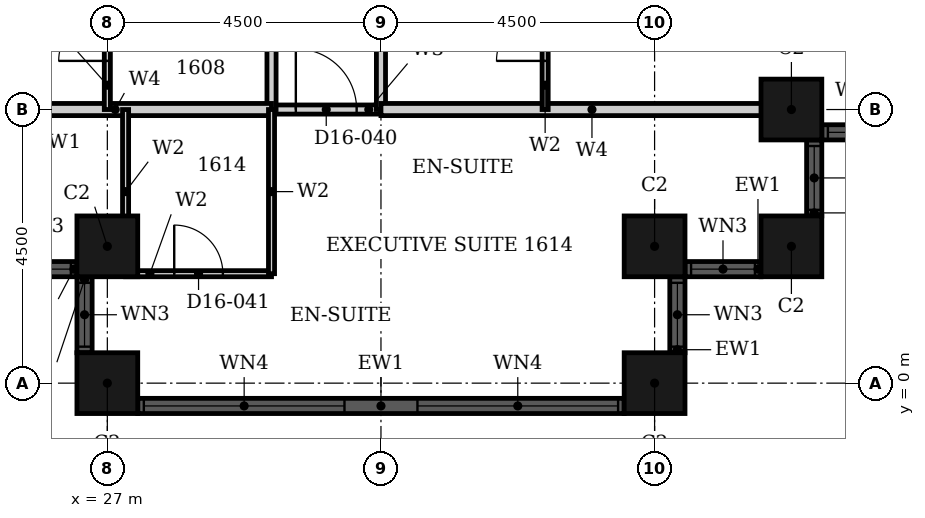
"""IFC4 building model, lengths in metres.
Left out: names, types, materials, properties, quantities, classifications, styles, units other than length and angle.
Written with IfcOpenShell. Run it as: python <this file> out.ifc"""

import sys

from ifc_helpers import new_model, si_unit, direction, frame, frame_2d, origin, origin_2d, place, context, subcontext, project, spatial, rectangle, hollow_rectangle, extrude, element, fill, save


model = new_model("IFC4")
c1 = context("Model", 3, precision=1e-05, world=origin(), true_north=direction((0.0, 1.0)))
c2 = subcontext(c1, "Body", "Model", "MODEL_VIEW")
j1 = project(units=[si_unit("LENGTHUNIT", "METRE"), si_unit("PLANEANGLEUNIT", "RADIAN")], contexts=[c1])
p1 = place(None, origin())
s1 = spatial("IfcSite", under=j1, at=p1, CompositionType="ELEMENT")
p2 = place(p1, origin())
s2 = spatial("IfcBuilding", under=s1, at=p2, CompositionType="ELEMENT")
p3 = place(p2, frame((0.0, 0.0, 70.8)))
s3 = spatial("IfcBuildingStorey", under=s2, at=p3, CompositionType="ELEMENT", Elevation=70.8)
for number, where, z_axis, x_axis in (
    (1, (27.0, 2.25, 0.0), (0.0, 0.0, 1.0), (1.0, 0.0, 0.0)),
    (2, (27.0, 0.0, 0.0), (0.0, 0.0, 1.0), (1.0, 0.0, 0.0)),
    (3, (36.0, 0.0, 0.0), (0.0, 0.0, 1.0), (1.0, 0.0, 0.0)),
    (4, (36.0, 2.25, 0.0), (0.0, 0.0, 1.0), (1.0, 0.0, 0.0)),
    (5, (38.25, 2.25, 0.0), (0.0, 0.0, 1.0), (1.0, 0.0, 0.0)),
    (6, (38.25, 4.5, 0.0), (0.0, 0.0, 1.0), (1.0, 0.0, 0.0)),
):
    element("IfcColumn", number, at=place(p3, frame(where, z_axis=z_axis, x_axis=x_axis)), inside=s3, PredefinedType="COLUMN", context=c2, shape_type="SweptSolid", body=[
        extrude(hollow_rectangle(XDim=1.0, YDim=1.0, WallThickness=0.032, at=origin_2d()), origin(), (0.0, 0.0, 1.0), 3.6),
    ])
p4 = place(p3, frame((25.25, 1.875, 0.0), z_axis=(0.0, 0.0, 1.0), x_axis=(1.0, 0.0, 0.0)))
e7 = element("IfcWall", 7, at=p4, inside=s3, PredefinedType="SOLIDWALL", context=c2, shape_type="SweptSolid", body=[
    extrude(rectangle(XDim=1.25, YDim=0.25, at=frame_2d((0.625, 0.0))), origin(), (0.0, 0.0, 1.0), 3.6),
])
p5 = place(p4, frame((0.1, 0.0, 0.9)))
e8 = element("IfcOpeningElement", 8, at=p5, cuts=e7, PredefinedType="OPENING", context=c2, shape_type="SweptSolid", body=[
    extrude(rectangle(XDim=1.05, YDim=2.08, at=frame_2d((0.525, 1.04))), frame((0.0, 0.135, 0.0), z_axis=(0.0, -1.0, 0.0), x_axis=(1.0, 0.0, 0.0)), (0.0, 0.0, 1.0), 0.27),
])
p6 = place(p3, frame((26.625, 1.75, 0.0), z_axis=(0.0, 0.0, 1.0), x_axis=(0.0, -1.0, 0.0)))
e9 = element("IfcWall", 9, at=p6, inside=s3, PredefinedType="SOLIDWALL", context=c2, shape_type="SweptSolid", body=[
    extrude(rectangle(XDim=1.25, YDim=0.25, at=frame_2d((0.625, 0.0))), origin(), (0.0, 0.0, 1.0), 3.6),
])
p7 = place(p6, frame((0.1, 0.0, 0.9)))
e10 = element("IfcOpeningElement", 10, at=p7, cuts=e9, PredefinedType="OPENING", context=c2, shape_type="SweptSolid", body=[
    extrude(rectangle(XDim=1.05, YDim=2.08, at=frame_2d((0.525, 1.04))), frame((0.0, 0.135, 0.0), z_axis=(0.0, -1.0, 0.0), x_axis=(1.0, 0.0, 0.0)), (0.0, 0.0, 1.0), 0.27),
])
p8 = place(p3, frame((27.5, -0.375, 0.0), z_axis=(0.0, 0.0, 1.0), x_axis=(1.0, 0.0, 0.0)))
e11 = element("IfcWall", 11, at=p8, inside=s3, PredefinedType="SOLIDWALL", context=c2, shape_type="SweptSolid", body=[
    extrude(rectangle(XDim=8.0, YDim=0.25, at=frame_2d((4.0, 0.0))), origin(), (0.0, 0.0, 1.0), 3.6),
])
p9 = place(p8, frame((0.1, 0.0, 0.9)))
e12 = element("IfcOpeningElement", 12, at=p9, cuts=e11, PredefinedType="OPENING", context=c2, shape_type="SweptSolid", body=[
    extrude(rectangle(XDim=3.3, YDim=2.08, at=frame_2d((1.65, 1.04))), frame((0.0, 0.135, 0.0), z_axis=(0.0, -1.0, 0.0), x_axis=(1.0, 0.0, 0.0)), (0.0, 0.0, 1.0), 0.27),
])
p10 = place(p8, frame((4.6, 0.0, 0.9)))
e13 = element("IfcOpeningElement", 13, at=p10, cuts=e11, PredefinedType="OPENING", context=c2, shape_type="SweptSolid", body=[
    extrude(rectangle(XDim=3.3, YDim=2.08, at=frame_2d((1.65, 1.04))), frame((0.0, 0.135, 0.0), z_axis=(0.0, -1.0, 0.0), x_axis=(1.0, 0.0, 0.0)), (0.0, 0.0, 1.0), 0.27),
])
p11 = place(p3, frame((36.375, 0.5, 0.0), z_axis=(0.0, 0.0, 1.0), x_axis=(0.0, 1.0, 0.0)))
e14 = element("IfcWall", 14, at=p11, inside=s3, PredefinedType="SOLIDWALL", context=c2, shape_type="SweptSolid", body=[
    extrude(rectangle(XDim=1.25, YDim=0.25, at=frame_2d((0.625, 0.0))), origin(), (0.0, 0.0, 1.0), 3.6),
])
p12 = place(p11, frame((0.1, 0.0, 0.9)))
e15 = element("IfcOpeningElement", 15, at=p12, cuts=e14, PredefinedType="OPENING", context=c2, shape_type="SweptSolid", body=[
    extrude(rectangle(XDim=1.05, YDim=2.08, at=frame_2d((0.525, 1.04))), frame((0.0, 0.135, 0.0), z_axis=(0.0, -1.0, 0.0), x_axis=(1.0, 0.0, 0.0)), (0.0, 0.0, 1.0), 0.27),
])
p13 = place(p3, frame((36.5, 1.875, 0.0), z_axis=(0.0, 0.0, 1.0), x_axis=(1.0, 0.0, 0.0)))
e16 = element("IfcWall", 16, at=p13, inside=s3, PredefinedType="SOLIDWALL", context=c2, shape_type="SweptSolid", body=[
    extrude(rectangle(XDim=1.25, YDim=0.25, at=frame_2d((0.625, 0.0))), origin(), (0.0, 0.0, 1.0), 3.6),
])
p14 = place(p13, frame((0.1, 0.0, 0.9)))
e17 = element("IfcOpeningElement", 17, at=p14, cuts=e16, PredefinedType="OPENING", context=c2, shape_type="SweptSolid", body=[
    extrude(rectangle(XDim=1.05, YDim=2.08, at=frame_2d((0.525, 1.04))), frame((0.0, 0.135, 0.0), z_axis=(0.0, -1.0, 0.0), x_axis=(1.0, 0.0, 0.0)), (0.0, 0.0, 1.0), 0.27),
])
p15 = place(p3, frame((38.625, 2.75, 0.0), z_axis=(0.0, 0.0, 1.0), x_axis=(0.0, 1.0, 0.0)))
e18 = element("IfcWall", 18, at=p15, inside=s3, PredefinedType="SOLIDWALL", context=c2, shape_type="SweptSolid", body=[
    extrude(rectangle(XDim=1.25, YDim=0.25, at=frame_2d((0.625, 0.0))), origin(), (0.0, 0.0, 1.0), 3.6),
])
p16 = place(p15, frame((0.1, 0.0, 0.9)))
e19 = element("IfcOpeningElement", 19, at=p16, cuts=e18, PredefinedType="OPENING", context=c2, shape_type="SweptSolid", body=[
    extrude(rectangle(XDim=1.05, YDim=2.08, at=frame_2d((0.525, 1.04))), frame((0.0, 0.135, 0.0), z_axis=(0.0, -1.0, 0.0), x_axis=(1.0, 0.0, 0.0)), (0.0, 0.0, 1.0), 0.27),
])
p17 = place(p3, frame((38.75, 4.125, 0.0), z_axis=(0.0, 0.0, 1.0), x_axis=(1.0, 0.0, 0.0)))
e20 = element("IfcWall", 20, at=p17, inside=s3, PredefinedType="SOLIDWALL", context=c2, shape_type="SweptSolid", body=[
    extrude(rectangle(XDim=1.25, YDim=0.25, at=frame_2d((0.625, 0.0))), origin(), (0.0, 0.0, 1.0), 3.6),
])
p18 = place(p17, frame((0.1, 0.0, 0.9)))
e21 = element("IfcOpeningElement", 21, at=p18, cuts=e20, PredefinedType="OPENING", context=c2, shape_type="SweptSolid", body=[
    extrude(rectangle(XDim=1.05, YDim=2.08, at=frame_2d((0.525, 1.04))), frame((0.0, 0.135, 0.0), z_axis=(0.0, -1.0, 0.0), x_axis=(1.0, 0.0, 0.0)), (0.0, 0.0, 1.0), 0.27),
])
p19 = place(p3, frame((29.7, 4.5, 0.0), z_axis=(0.0, 0.0, 1.0), x_axis=(1.0, 0.0, 0.0)))
e22 = element("IfcWall", 22, at=p19, inside=s3, PredefinedType="PARTITIONING", context=c2, shape_type="SweptSolid", body=[
    extrude(rectangle(XDim=1.8, YDim=0.15, at=frame_2d((0.9, 0.0))), origin(), (0.0, 0.0, 1.0), 3.3),
])
p20 = place(p19, frame((0.4, 0.0, 0.0)))
e23 = element("IfcOpeningElement", 23, at=p20, cuts=e22, PredefinedType="OPENING", context=c2, shape_type="SweptSolid", body=[
    extrude(rectangle(XDim=1.0, YDim=2.1, at=frame_2d((0.5, 1.05))), frame((0.0, 0.085, 0.0), z_axis=(0.0, -1.0, 0.0), x_axis=(1.0, 0.0, 0.0)), (0.0, 0.0, 1.0), 0.17),
])
p21 = place(p3, frame((29.7, 4.5, 0.0), z_axis=(0.0, 0.0, 1.0), x_axis=(0.0, 1.0, 0.0)))
e24 = element("IfcWall", 24, at=p21, inside=s3, PredefinedType="PARTITIONING", context=c2, shape_type="SweptSolid", body=[
    extrude(rectangle(XDim=16.2, YDim=0.15, at=frame_2d((8.1, 0.0))), origin(), (0.0, 0.0, 1.0), 3.3),
])
p22 = place(p21, frame((6.25, 0.0, 0.0)))
e25 = element("IfcOpeningElement", 25, at=p22, cuts=e24, PredefinedType="OPENING", context=c2, shape_type="SweptSolid", body=[
    extrude(rectangle(XDim=1.0, YDim=2.1, at=frame_2d((0.5, 1.05))), frame((0.0, 0.085, 0.0), z_axis=(0.0, -1.0, 0.0), x_axis=(1.0, 0.0, 0.0)), (0.0, 0.0, 1.0), 0.17),
])
p23 = place(p3, frame((31.5, 4.5, 0.0), z_axis=(0.0, 0.0, 1.0), x_axis=(0.0, 1.0, 0.0)))
e26 = element("IfcWall", 26, at=p23, inside=s3, PredefinedType="PARTITIONING", context=c2, shape_type="SweptSolid", body=[
    extrude(rectangle(XDim=16.2, YDim=0.15, at=frame_2d((8.1, 0.0))), origin(), (0.0, 0.0, 1.0), 2.58),
])
p24 = place(p23, frame((7.45, 0.0, 0.0)))
e27 = element("IfcOpeningElement", 27, at=p24, cuts=e26, PredefinedType="OPENING", context=c2, shape_type="SweptSolid", body=[
    extrude(rectangle(XDim=1.0, YDim=2.1, at=frame_2d((0.5, 1.05))), frame((0.0, 0.085, 0.0), z_axis=(0.0, -1.0, 0.0), x_axis=(1.0, 0.0, 0.0)), (0.0, 0.0, 1.0), 0.17),
])
p25 = place(p23, frame((2.95, 0.0, 0.0)))
e28 = element("IfcOpeningElement", 28, at=p25, cuts=e26, PredefinedType="OPENING", context=c2, shape_type="SweptSolid", body=[
    extrude(rectangle(XDim=1.0, YDim=2.1, at=frame_2d((0.5, 1.05))), frame((0.0, 0.085, 0.0), z_axis=(0.0, -1.0, 0.0), x_axis=(1.0, 0.0, 0.0)), (0.0, 0.0, 1.0), 0.17),
])
p26 = place(p3, frame((31.5, 4.5, 0.0), z_axis=(0.0, 0.0, 1.0), x_axis=(1.0, 0.0, 0.0)))
e29 = element("IfcWall", 29, at=p26, inside=s3, PredefinedType="PARTITIONING", context=c2, shape_type="SweptSolid", body=[
    extrude(rectangle(XDim=6.94, YDim=0.2, at=frame_2d((3.47, 0.0))), origin(), (0.0, 0.0, 1.0), 3.3),
])
p27 = place(p3, frame((24.56, 4.5, 0.0), z_axis=(0.0, 0.0, 1.0), x_axis=(1.0, 0.0, 0.0)))
e30 = element("IfcWall", 30, at=p27, inside=s3, PredefinedType="PARTITIONING", context=c2, shape_type="SweptSolid", body=[
    extrude(rectangle(XDim=5.14, YDim=0.2, at=frame_2d((2.57, 0.0))), origin(), (0.0, 0.0, 1.0), 3.3),
])
p28 = place(p3, frame((27.3, 1.8, 0.0), z_axis=(0.0, 0.0, 1.0), x_axis=(1.0, 0.0, 0.0)))
e31 = element("IfcWall", 31, at=p28, inside=s3, PredefinedType="PARTITIONING", context=c2, shape_type="SweptSolid", body=[
    extrude(rectangle(XDim=2.4, YDim=0.1, at=frame_2d((1.2, 0.0))), origin(), (0.0, 0.0, 1.0), 3.3),
])
p29 = place(p28, frame((0.8, 0.0, 0.0)))
e32 = element("IfcOpeningElement", 32, at=p29, cuts=e31, PredefinedType="OPENING", context=c2, shape_type="SweptSolid", body=[
    extrude(rectangle(XDim=0.8, YDim=2.1, at=frame_2d((0.4, 1.05))), frame((0.0, 0.06, 0.0), z_axis=(0.0, -1.0, 0.0), x_axis=(1.0, 0.0, 0.0)), (0.0, 0.0, 1.0), 0.12),
])
p30 = place(p3, frame((27.0, 4.5, 0.0), z_axis=(0.0, 0.0, 1.0), x_axis=(0.0, 1.0, 0.0)))
e33 = element("IfcWall", 33, at=p30, inside=s3, PredefinedType="PARTITIONING", context=c2, shape_type="SweptSolid", body=[
    extrude(rectangle(XDim=2.4, YDim=0.1, at=frame_2d((1.2, 0.0))), origin(), (0.0, 0.0, 1.0), 2.58),
])
p31 = place(p30, frame((0.8, 0.0, 0.0)))
e34 = element("IfcOpeningElement", 34, at=p31, cuts=e33, PredefinedType="OPENING", context=c2, shape_type="SweptSolid", body=[
    extrude(rectangle(XDim=0.8, YDim=2.1, at=frame_2d((0.4, 1.05))), frame((0.0, 0.06, 0.0), z_axis=(0.0, -1.0, 0.0), x_axis=(1.0, 0.0, 0.0)), (0.0, 0.0, 1.0), 0.12),
])
for number, where, z_axis, x_axis in (
    (35, (27.3, 1.8, 0.0), (0.0, 0.0, 1.0), (0.0, 1.0, 0.0)),
    (36, (29.7, 1.8, 0.0), (0.0, 0.0, 1.0), (0.0, 1.0, 0.0)),
):
    element("IfcWall", number, at=place(p3, frame(where, z_axis=z_axis, x_axis=x_axis)), inside=s3, PredefinedType="PARTITIONING", context=c2, shape_type="SweptSolid", body=[
        extrude(rectangle(XDim=2.7, YDim=0.1, at=frame_2d((1.35, 0.0))), origin(), (0.0, 0.0, 1.0), 3.3),
    ])
p32 = place(p3, frame((34.2, 4.5, 0.0), z_axis=(0.0, 0.0, 1.0), x_axis=(0.0, 1.0, 0.0)))
e37 = element("IfcWall", 37, at=p32, inside=s3, PredefinedType="PARTITIONING", context=c2, shape_type="SweptSolid", body=[
    extrude(rectangle(XDim=2.4, YDim=0.1, at=frame_2d((1.2, 0.0))), origin(), (0.0, 0.0, 1.0), 3.3),
])
p33 = place(p32, frame((0.8, 0.0, 0.0)))
e38 = element("IfcOpeningElement", 38, at=p33, cuts=e37, PredefinedType="OPENING", context=c2, shape_type="SweptSolid", body=[
    extrude(rectangle(XDim=0.8, YDim=2.1, at=frame_2d((0.4, 1.05))), frame((0.0, 0.06, 0.0), z_axis=(0.0, -1.0, 0.0), x_axis=(1.0, 0.0, 0.0)), (0.0, 0.0, 1.0), 0.12),
])
p34 = place(p5, origin())
e39 = element("IfcWindow", 39, at=p34, inside=s3, PartitioningType="SINGLE_PANEL", PredefinedType="WINDOW", context=c2, shape_type="SweptSolid", body=[
    extrude(rectangle(XDim=1.05, YDim=2.08, at=frame_2d((0.525, 1.04))), frame((0.0, 0.03, 0.0), z_axis=(0.0, -1.0, 0.0), x_axis=(1.0, 0.0, 0.0)), (0.0, 0.0, 1.0), 0.06),
])
fill(e8, e39)
p35 = place(p7, origin())
e40 = element("IfcWindow", 40, at=p35, inside=s3, PartitioningType="SINGLE_PANEL", PredefinedType="WINDOW", context=c2, shape_type="SweptSolid", body=[
    extrude(rectangle(XDim=1.05, YDim=2.08, at=frame_2d((0.525, 1.04))), frame((0.0, 0.03, 0.0), z_axis=(0.0, -1.0, 0.0), x_axis=(1.0, 0.0, 0.0)), (0.0, 0.0, 1.0), 0.06),
])
fill(e10, e40)
p36 = place(p9, origin())
e41 = element("IfcWindow", 41, at=p36, inside=s3, PartitioningType="SINGLE_PANEL", PredefinedType="WINDOW", context=c2, shape_type="SweptSolid", body=[
    extrude(rectangle(XDim=3.3, YDim=2.08, at=frame_2d((1.65, 1.04))), frame((0.0, 0.03, 0.0), z_axis=(0.0, -1.0, 0.0), x_axis=(1.0, 0.0, 0.0)), (0.0, 0.0, 1.0), 0.06),
])
fill(e12, e41)
p37 = place(p10, origin())
e42 = element("IfcWindow", 42, at=p37, inside=s3, PartitioningType="SINGLE_PANEL", PredefinedType="WINDOW", context=c2, shape_type="SweptSolid", body=[
    extrude(rectangle(XDim=3.3, YDim=2.08, at=frame_2d((1.65, 1.04))), frame((0.0, 0.03, 0.0), z_axis=(0.0, -1.0, 0.0), x_axis=(1.0, 0.0, 0.0)), (0.0, 0.0, 1.0), 0.06),
])
fill(e13, e42)
p38 = place(p12, origin())
e43 = element("IfcWindow", 43, at=p38, inside=s3, PartitioningType="SINGLE_PANEL", PredefinedType="WINDOW", context=c2, shape_type="SweptSolid", body=[
    extrude(rectangle(XDim=1.05, YDim=2.08, at=frame_2d((0.525, 1.04))), frame((0.0, 0.03, 0.0), z_axis=(0.0, -1.0, 0.0), x_axis=(1.0, 0.0, 0.0)), (0.0, 0.0, 1.0), 0.06),
])
fill(e15, e43)
p39 = place(p14, origin())
e44 = element("IfcWindow", 44, at=p39, inside=s3, PartitioningType="SINGLE_PANEL", PredefinedType="WINDOW", context=c2, shape_type="SweptSolid", body=[
    extrude(rectangle(XDim=1.05, YDim=2.08, at=frame_2d((0.525, 1.04))), frame((0.0, 0.03, 0.0), z_axis=(0.0, -1.0, 0.0), x_axis=(1.0, 0.0, 0.0)), (0.0, 0.0, 1.0), 0.06),
])
fill(e17, e44)
p40 = place(p16, origin())
e45 = element("IfcWindow", 45, at=p40, inside=s3, PartitioningType="SINGLE_PANEL", PredefinedType="WINDOW", context=c2, shape_type="SweptSolid", body=[
    extrude(rectangle(XDim=1.05, YDim=2.08, at=frame_2d((0.525, 1.04))), frame((0.0, 0.03, 0.0), z_axis=(0.0, -1.0, 0.0), x_axis=(1.0, 0.0, 0.0)), (0.0, 0.0, 1.0), 0.06),
])
fill(e19, e45)
p41 = place(p18, origin())
e46 = element("IfcWindow", 46, at=p41, inside=s3, PartitioningType="SINGLE_PANEL", PredefinedType="WINDOW", context=c2, shape_type="SweptSolid", body=[
    extrude(rectangle(XDim=1.05, YDim=2.08, at=frame_2d((0.525, 1.04))), frame((0.0, 0.03, 0.0), z_axis=(0.0, -1.0, 0.0), x_axis=(1.0, 0.0, 0.0)), (0.0, 0.0, 1.0), 0.06),
])
fill(e21, e46)
p42 = place(p31, origin())
e47 = element("IfcDoor", 47, at=p42, inside=s3, OperationType="SINGLE_SWING_LEFT", PredefinedType="DOOR", context=c2, shape_type="SweptSolid", body=[
    extrude(rectangle(XDim=0.8, YDim=2.1, at=frame_2d((0.4, 1.05))), frame((0.0, 0.025, 0.0), z_axis=(0.0, -1.0, 0.0), x_axis=(1.0, 0.0, 0.0)), (0.0, 0.0, 1.0), 0.05),
])
fill(e34, e47)
p43 = place(p33, origin())
e48 = element("IfcDoor", 48, at=p43, inside=s3, OperationType="SINGLE_SWING_LEFT", PredefinedType="DOOR", context=c2, shape_type="SweptSolid", body=[
    extrude(rectangle(XDim=0.8, YDim=2.1, at=frame_2d((0.4, 1.05))), frame((0.0, 0.025, 0.0), z_axis=(0.0, -1.0, 0.0), x_axis=(1.0, 0.0, 0.0)), (0.0, 0.0, 1.0), 0.05),
])
fill(e38, e48)
p44 = place(p20, origin())
e49 = element("IfcDoor", 49, at=p44, inside=s3, OperationType="SINGLE_SWING_LEFT", PredefinedType="DOOR", context=c2, shape_type="SweptSolid", body=[
    extrude(rectangle(XDim=1.0, YDim=2.1, at=frame_2d((0.5, 1.05))), frame((0.0, 0.025, 0.0), z_axis=(0.0, -1.0, 0.0), x_axis=(1.0, 0.0, 0.0)), (0.0, 0.0, 1.0), 0.05),
])
fill(e23, e49)
p45 = place(p29, origin())
e50 = element("IfcDoor", 50, at=p45, inside=s3, OperationType="SINGLE_SWING_LEFT", PredefinedType="DOOR", context=c2, shape_type="SweptSolid", body=[
    extrude(rectangle(XDim=0.8, YDim=2.1, at=frame_2d((0.4, 1.05))), frame((0.0, 0.025, 0.0), z_axis=(0.0, -1.0, 0.0), x_axis=(1.0, 0.0, 0.0)), (0.0, 0.0, 1.0), 0.05),
])
fill(e32, e50)
save(model, sys.argv[1])
